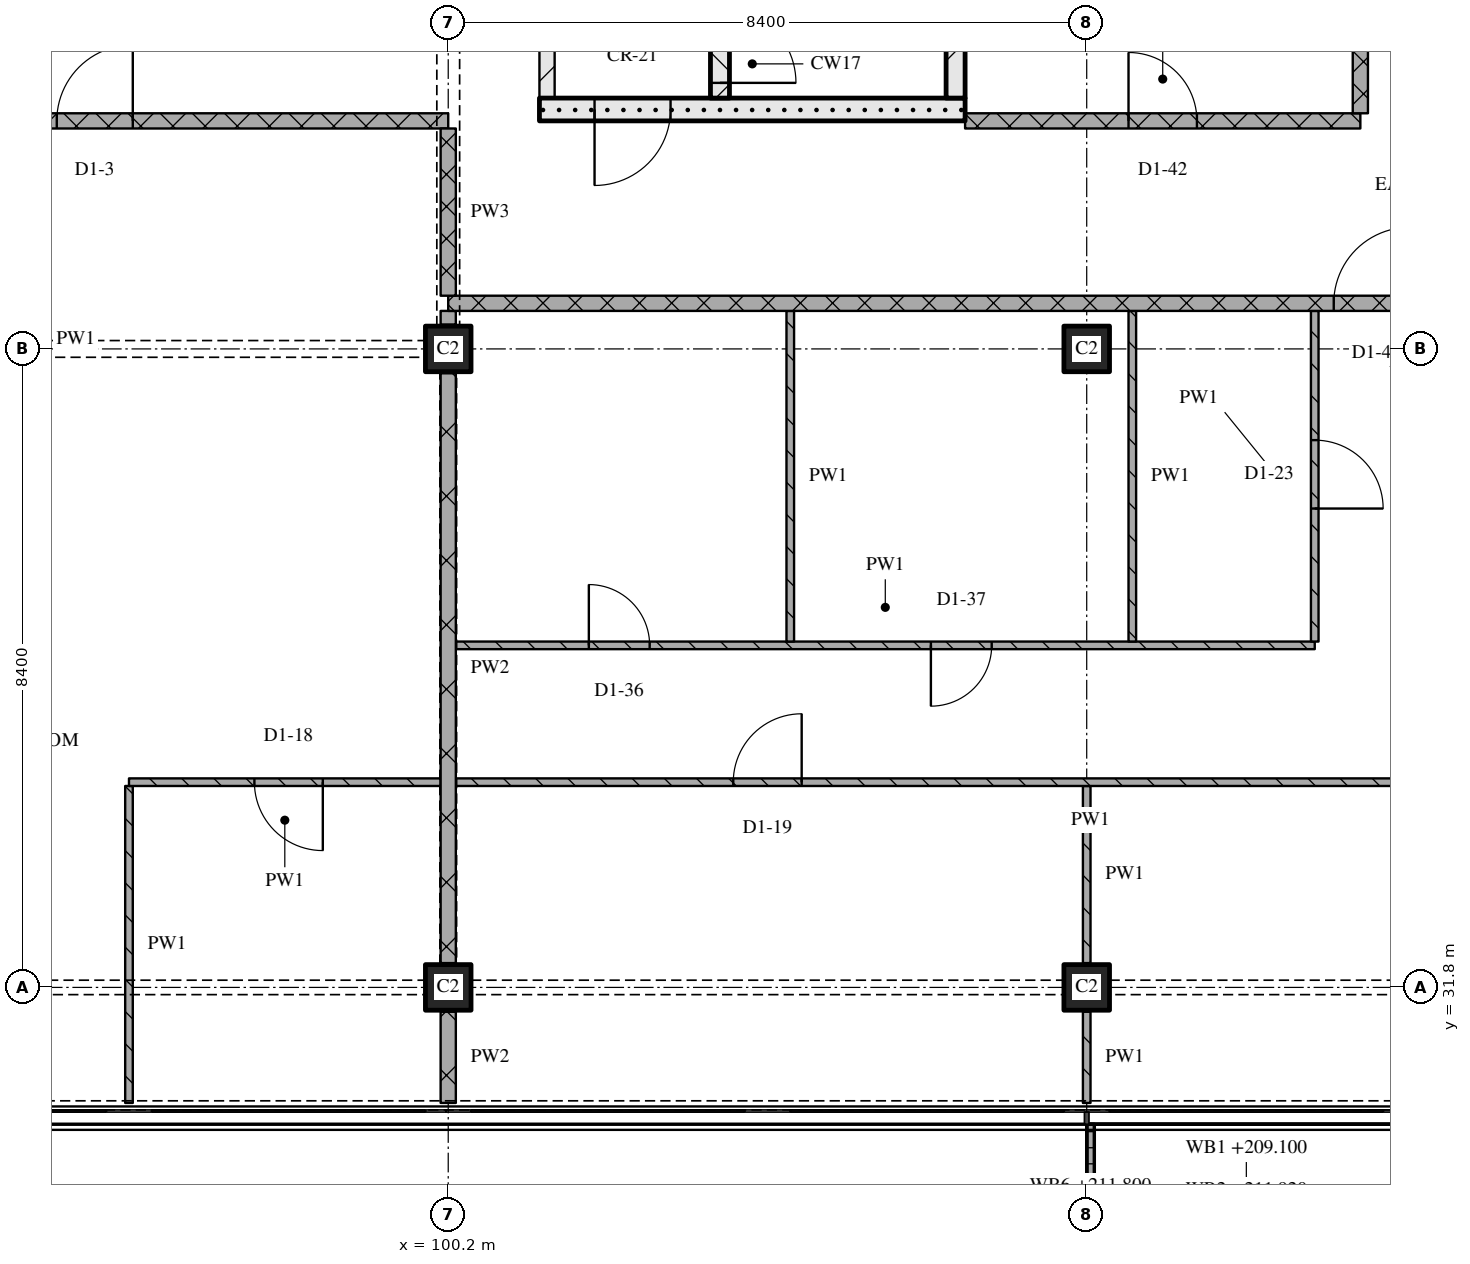
"""IFC4 building model, lengths in metres.
Left out: names, types, materials, properties, quantities, classifications, styles, units other than length and angle.
Written with IfcOpenShell. Run it as: python <this file> out.ifc"""

import sys

from ifc_helpers import new_model, si_unit, direction, frame, frame_2d, origin, origin_2d, place, context, subcontext, project, spatial, polyline, rectangle, outline, extrude, element, fill, save


model = new_model("IFC4")
c1 = context("Model", 3, precision=1e-05, world=origin(), true_north=direction((0.0, 1.0)))
c2 = subcontext(c1, "Body", "Model", "MODEL_VIEW")
j1 = project(units=[si_unit("LENGTHUNIT", "METRE"), si_unit("PLANEANGLEUNIT", "RADIAN")], contexts=[c1])
p1 = place(None, origin())
s1 = spatial("IfcSite", under=j1, at=p1, CompositionType="ELEMENT")
p2 = place(p1, origin())
s2 = spatial("IfcBuilding", under=s1, at=p2, CompositionType="ELEMENT")
p3 = place(p2, frame((0.0, 0.0, 209.1)))
s3 = spatial("IfcBuildingStorey", under=s2, at=p3, CompositionType="ELEMENT", Elevation=209.1)
for number, where, z_axis, x_axis in (
    (1, (100.2, 31.8, 0.0), (0.0, 0.0, 1.0), (1.0, 0.0, 0.0)),
    (2, (100.2, 40.2, 0.0), (0.0, 0.0, 1.0), (1.0, 0.0, 0.0)),
    (3, (108.6, 31.8, 0.0), (0.0, 0.0, 1.0), (1.0, 0.0, 0.0)),
    (4, (108.6, 40.2, 0.0), (0.0, 0.0, 1.0), (1.0, 0.0, 0.0)),
):
    element("IfcColumn", number, at=place(p3, frame(where, z_axis=z_axis, x_axis=x_axis)), inside=s3, PredefinedType="COLUMN", context=c2, shape_type="SweptSolid", body=[
        extrude(rectangle(XDim=0.6, YDim=0.6, at=origin_2d()), origin(), (0.0, 0.0, 1.0), 3.6),
    ])
p4 = place(p3, origin())
e5 = element("IfcWall", 5, at=p4, inside=s3, PredefinedType="SOLIDWALL", context=c2, shape_type="SweptSolid", body=[
    extrude(outline(polyline([(108.6, 30.0), (108.7, 30.0), (108.7, 28.367), (112.7, 28.367), (112.7, 30.0), (112.8, 30.0), (112.8, 28.267), (108.6, 28.267), (108.6, 30.0)])), origin(), (0.0, 0.0, 1.0), 1.0),
])
p5 = place(p3, frame((101.4, 43.35, 0.0), z_axis=(0.0, 0.0, 1.0), x_axis=(1.0, 0.0, 0.0)))
e6 = element("IfcWall", 6, at=p5, inside=s3, PredefinedType="SOLIDWALL", context=c2, shape_type="SweptSolid", body=[
    extrude(rectangle(XDim=5.6, YDim=0.3, at=frame_2d((2.8, 0.0))), origin(), (0.0, 0.0, 1.0), 3.32),
])
p6 = place(p5, frame((0.725, 0.0, 0.0)))
e7 = element("IfcOpeningElement", 7, at=p6, cuts=e6, PredefinedType="OPENING", context=c2, shape_type="SweptSolid", body=[
    extrude(rectangle(XDim=1.0, YDim=2.1, at=frame_2d((0.5, 1.05))), frame((0.0, 0.16, 0.0), z_axis=(0.0, -1.0, 0.0), x_axis=(1.0, 0.0, 0.0)), (0.0, 0.0, 1.0), 0.32),
])
p7 = place(p3, frame((101.5, 43.5, 0.0), z_axis=(0.0, 0.0, 1.0), x_axis=(0.0, 1.0, 0.0)))
e8 = element("IfcWall", 8, at=p7, inside=s3, PredefinedType="PARTITIONING", context=c2, shape_type="SweptSolid", body=[
    extrude(rectangle(XDim=6.9, YDim=0.2, at=frame_2d((3.45, 0.0))), origin(), (0.0, 0.0, 1.0), 3.32),
])
p8 = place(p7, frame((1.0, 0.0, 0.0)))
e9 = element("IfcOpeningElement", 9, at=p8, cuts=e8, PredefinedType="OPENING", context=c2, shape_type="SweptSolid", body=[
    extrude(rectangle(XDim=1.0, YDim=2.1, at=frame_2d((0.5, 1.05))), frame((0.0, 0.11, 0.0), z_axis=(0.0, -1.0, 0.0), x_axis=(1.0, 0.0, 0.0)), (0.0, 0.0, 1.0), 0.22),
])
p9 = place(p3, frame((103.775, 43.5, 0.0), z_axis=(0.0, 0.0, 1.0), x_axis=(0.0, 1.0, 0.0)))
e10 = element("IfcWall", 10, at=p9, inside=s3, PredefinedType="SOLIDWALL", context=c2, shape_type="SweptSolid", body=[
    extrude(rectangle(XDim=6.9, YDim=0.25, at=frame_2d((3.45, 0.0))), origin(), (0.0, 0.0, 1.0), 3.32),
])
p10 = place(p9, frame((0.2, 0.0, 0.0)))
e11 = element("IfcOpeningElement", 11, at=p10, cuts=e10, PredefinedType="OPENING", context=c2, shape_type="SweptSolid", body=[
    extrude(rectangle(XDim=1.0, YDim=2.1, at=frame_2d((0.5, 1.05))), frame((0.0, 0.135, 0.0), z_axis=(0.0, -1.0, 0.0), x_axis=(1.0, 0.0, 0.0)), (0.0, 0.0, 1.0), 0.27),
])
p11 = place(p3, frame((106.875, 43.5, 0.0), z_axis=(0.0, 0.0, 1.0), x_axis=(0.0, 1.0, 0.0)))
e12 = element("IfcWall", 12, at=p11, inside=s3, PredefinedType="SOLIDWALL", context=c2, shape_type="SweptSolid", body=[
    extrude(rectangle(XDim=6.9, YDim=0.25, at=frame_2d((3.45, 0.0))), origin(), (0.0, 0.0, 1.0), 3.32),
])
p12 = place(p3, frame((100.3, 36.3, 0.0), z_axis=(0.0, 0.0, 1.0), x_axis=(1.0, 0.0, 0.0)))
e13 = element("IfcWall", 13, at=p12, inside=s3, PredefinedType="PARTITIONING", context=c2, shape_type="SweptSolid", body=[
    extrude(rectangle(XDim=11.3, YDim=0.1, at=frame_2d((5.65, 0.0))), origin(), (0.0, 0.0, 1.0), 3.32),
])
p13 = place(p12, frame((1.75, 0.0, 0.0)))
e14 = element("IfcOpeningElement", 14, at=p13, cuts=e13, PredefinedType="OPENING", context=c2, shape_type="SweptSolid", body=[
    extrude(rectangle(XDim=0.8, YDim=2.1, at=frame_2d((0.4, 1.05))), frame((0.0, 0.06, 0.0), z_axis=(0.0, -1.0, 0.0), x_axis=(1.0, 0.0, 0.0)), (0.0, 0.0, 1.0), 0.12),
])
p14 = place(p12, frame((6.25, 0.0, 0.0)))
e15 = element("IfcOpeningElement", 15, at=p14, cuts=e13, PredefinedType="OPENING", context=c2, shape_type="SweptSolid", body=[
    extrude(rectangle(XDim=0.8, YDim=2.1, at=frame_2d((0.4, 1.05))), frame((0.0, 0.06, 0.0), z_axis=(0.0, -1.0, 0.0), x_axis=(1.0, 0.0, 0.0)), (0.0, 0.0, 1.0), 0.12),
])
p15 = place(p3, frame((124.58, 40.8, 0.0), z_axis=(0.0, 0.0, 1.0), x_axis=(-1.0, 0.0, 0.0)))
e16 = element("IfcWall", 16, at=p15, inside=s3, PredefinedType="PARTITIONING", context=c2, shape_type="SweptSolid", body=[
    extrude(rectangle(XDim=24.38, YDim=0.2, at=frame_2d((12.19, 0.0))), origin(), (0.0, 0.0, 1.0), 3.32),
])
p16 = place(p15, frame((11.73, 0.0, 0.0)))
e17 = element("IfcOpeningElement", 17, at=p16, cuts=e16, PredefinedType="OPENING", context=c2, shape_type="SweptSolid", body=[
    extrude(rectangle(XDim=1.0, YDim=2.1, at=frame_2d((0.5, 1.05))), frame((0.0, 0.11, 0.0), z_axis=(0.0, -1.0, 0.0), x_axis=(1.0, 0.0, 0.0)), (0.0, 0.0, 1.0), 0.22),
])
p17 = place(p3, frame((100.2, 43.2, 0.0), z_axis=(0.0, 0.0, 1.0), x_axis=(-1.0, 0.0, 0.0)))
e18 = element("IfcWall", 18, at=p17, inside=s3, PredefinedType="PARTITIONING", context=c2, shape_type="SweptSolid", body=[
    extrude(rectangle(XDim=25.2, YDim=0.2, at=frame_2d((12.6, 0.0))), origin(), (0.0, 0.0, 1.0), 3.32),
])
p18 = place(p17, frame((4.15, 0.0, 0.0)))
e19 = element("IfcOpeningElement", 19, at=p18, cuts=e18, PredefinedType="OPENING", context=c2, shape_type="SweptSolid", body=[
    extrude(rectangle(XDim=1.0, YDim=2.1, at=frame_2d((0.5, 1.05))), frame((0.0, 0.11, 0.0), z_axis=(0.0, -1.0, 0.0), x_axis=(1.0, 0.0, 0.0)), (0.0, 0.0, 1.0), 0.22),
])
p19 = place(p17, frame((17.35, 0.0, 0.0)))
e20 = element("IfcOpeningElement", 20, at=p19, cuts=e18, PredefinedType="OPENING", context=c2, shape_type="SweptSolid", body=[
    extrude(rectangle(XDim=1.0, YDim=2.1, at=frame_2d((0.5, 1.05))), frame((0.0, 0.11, 0.0), z_axis=(0.0, -1.0, 0.0), x_axis=(1.0, 0.0, 0.0)), (0.0, 0.0, 1.0), 0.22),
])
p20 = place(p3, frame((107.0, 43.2, 0.0), z_axis=(0.0, 0.0, 1.0), x_axis=(1.0, 0.0, 0.0)))
e21 = element("IfcWall", 21, at=p20, inside=s3, PredefinedType="PARTITIONING", context=c2, shape_type="SweptSolid", body=[
    extrude(rectangle(XDim=5.2, YDim=0.2, at=frame_2d((2.6, 0.0))), origin(), (0.0, 0.0, 1.0), 3.32),
])
p21 = place(p20, frame((2.15, 0.0, 0.0)))
e22 = element("IfcOpeningElement", 22, at=p21, cuts=e21, PredefinedType="OPENING", context=c2, shape_type="SweptSolid", body=[
    extrude(rectangle(XDim=0.9, YDim=2.1, at=frame_2d((0.45, 1.05))), frame((0.0, 0.11, 0.0), z_axis=(0.0, -1.0, 0.0), x_axis=(1.0, 0.0, 0.0)), (0.0, 0.0, 1.0), 0.22),
])
p22 = place(p3, frame((96.0, 34.45, 0.0), z_axis=(0.0, 0.0, 1.0), x_axis=(0.0, -1.0, 0.0)))
e23 = element("IfcWall", 23, at=p22, inside=s3, PredefinedType="PARTITIONING", context=c2, shape_type="SweptSolid", body=[
    extrude(rectangle(XDim=4.17, YDim=0.1, at=frame_2d((2.085, 0.0))), origin(), (0.0, 0.0, 1.0), 3.32),
])
p23 = place(p3, frame((100.2, 43.1, 0.0), z_axis=(0.0, 0.0, 1.0), x_axis=(0.0, -1.0, 0.0)))
e24 = element("IfcWall", 24, at=p23, inside=s3, PredefinedType="PARTITIONING", context=c2, shape_type="SweptSolid", body=[
    extrude(rectangle(XDim=2.2, YDim=0.2, at=frame_2d((1.1, 0.0))), origin(), (0.0, 0.0, 1.0), 2.53),
])
p24 = place(p3, frame((100.2, 31.48, 0.0), z_axis=(0.0, 0.0, 1.0), x_axis=(0.0, -1.0, 0.0)))
e25 = element("IfcWall", 25, at=p24, inside=s3, PredefinedType="PARTITIONING", context=c2, shape_type="SweptSolid", body=[
    extrude(rectangle(XDim=1.2, YDim=0.2, at=frame_2d((0.6, 0.0))), origin(), (0.0, 0.0, 1.0), 3.32),
])
p25 = place(p3, frame((100.2, 39.88, 0.0), z_axis=(0.0, 0.0, 1.0), x_axis=(0.0, -1.0, 0.0)))
e26 = element("IfcWall", 26, at=p25, inside=s3, PredefinedType="PARTITIONING", context=c2, shape_type="SweptSolid", body=[
    extrude(rectangle(XDim=7.76, YDim=0.2, at=frame_2d((3.88, 0.0))), origin(), (0.0, 0.0, 1.0), 2.72),
])
p26 = place(p3, frame((100.2, 40.7, 0.0), z_axis=(0.0, 0.0, 1.0), x_axis=(0.0, -1.0, 0.0)))
e27 = element("IfcWall", 27, at=p26, inside=s3, PredefinedType="PARTITIONING", context=c2, shape_type="SweptSolid", body=[
    extrude(rectangle(XDim=0.18, YDim=0.2, at=frame_2d((0.09, 0.0))), origin(), (0.0, 0.0, 1.0), 3.32),
])
p27 = place(p3, frame((104.7, 40.7, 0.0), z_axis=(0.0, 0.0, 1.0), x_axis=(0.0, -1.0, 0.0)))
e28 = element("IfcWall", 28, at=p27, inside=s3, PredefinedType="PARTITIONING", context=c2, shape_type="SweptSolid", body=[
    extrude(rectangle(XDim=4.35, YDim=0.1, at=frame_2d((2.175, 0.0))), origin(), (0.0, 0.0, 1.0), 3.32),
])
p28 = place(p3, frame((108.6, 31.48, 0.0), z_axis=(0.0, 0.0, 1.0), x_axis=(0.0, -1.0, 0.0)))
e29 = element("IfcWall", 29, at=p28, inside=s3, PredefinedType="PARTITIONING", context=c2, shape_type="SweptSolid", body=[
    extrude(rectangle(XDim=1.2, YDim=0.1, at=frame_2d((0.6, 0.0))), origin(), (0.0, 0.0, 1.0), 3.32),
])
p29 = place(p3, frame((108.6, 34.45, 0.0), z_axis=(0.0, 0.0, 1.0), x_axis=(0.0, -1.0, 0.0)))
e30 = element("IfcWall", 30, at=p29, inside=s3, PredefinedType="PARTITIONING", context=c2, shape_type="SweptSolid", body=[
    extrude(rectangle(XDim=2.33, YDim=0.1, at=frame_2d((1.165, 0.0))), origin(), (0.0, 0.0, 1.0), 3.32),
])
p30 = place(p3, frame((109.2, 40.7, 0.0), z_axis=(0.0, 0.0, 1.0), x_axis=(0.0, -1.0, 0.0)))
e31 = element("IfcWall", 31, at=p30, inside=s3, PredefinedType="PARTITIONING", context=c2, shape_type="SweptSolid", body=[
    extrude(rectangle(XDim=4.35, YDim=0.1, at=frame_2d((2.175, 0.0))), origin(), (0.0, 0.0, 1.0), 3.32),
])
p31 = place(p3, frame((111.6, 36.35, 0.0), z_axis=(0.0, 0.0, 1.0), x_axis=(0.0, 1.0, 0.0)))
e32 = element("IfcWall", 32, at=p31, inside=s3, PredefinedType="PARTITIONING", context=c2, shape_type="SweptSolid", body=[
    extrude(rectangle(XDim=4.35, YDim=0.1, at=frame_2d((2.175, 0.0))), origin(), (0.0, 0.0, 1.0), 3.32),
])
p32 = place(p31, frame((1.75, 0.0, 0.0)))
e33 = element("IfcOpeningElement", 33, at=p32, cuts=e32, PredefinedType="OPENING", context=c2, shape_type="SweptSolid", body=[
    extrude(rectangle(XDim=0.9, YDim=2.1, at=frame_2d((0.45, 1.05))), frame((0.0, 0.06, 0.0), z_axis=(0.0, -1.0, 0.0), x_axis=(1.0, 0.0, 0.0)), (0.0, 0.0, 1.0), 0.12),
])
p33 = place(p3, frame((112.2, 43.3, 0.0), z_axis=(0.0, 0.0, 1.0), x_axis=(0.0, 1.0, 0.0)))
e34 = element("IfcWall", 34, at=p33, inside=s3, PredefinedType="PARTITIONING", context=c2, shape_type="SweptSolid", body=[
    extrude(rectangle(XDim=15.4, YDim=0.2, at=frame_2d((7.7, 0.0))), origin(), (0.0, 0.0, 1.0), 3.32),
])
p34 = place(p33, frame((10.95, 0.0, 0.0)))
e35 = element("IfcOpeningElement", 35, at=p34, cuts=e34, PredefinedType="OPENING", context=c2, shape_type="SweptSolid", body=[
    extrude(rectangle(XDim=1.0, YDim=2.1, at=frame_2d((0.5, 1.05))), frame((0.0, 0.11, 0.0), z_axis=(0.0, -1.0, 0.0), x_axis=(1.0, 0.0, 0.0)), (0.0, 0.0, 1.0), 0.22),
])
p35 = place(p3, frame((100.1, 34.5, 0.0), z_axis=(0.0, 0.0, 1.0), x_axis=(-1.0, 0.0, 0.0)))
e36 = element("IfcWall", 36, at=p35, inside=s3, PredefinedType="PARTITIONING", context=c2, shape_type="SweptSolid", body=[
    extrude(rectangle(XDim=4.1, YDim=0.1, at=frame_2d((2.05, 0.0))), origin(), (0.0, 0.0, 1.0), 3.32),
])
p36 = place(p35, frame((1.55, 0.0, 0.0)))
e37 = element("IfcOpeningElement", 37, at=p36, cuts=e36, PredefinedType="OPENING", context=c2, shape_type="SweptSolid", body=[
    extrude(rectangle(XDim=0.9, YDim=2.1, at=frame_2d((0.45, 1.05))), frame((0.0, 0.06, 0.0), z_axis=(0.0, -1.0, 0.0), x_axis=(1.0, 0.0, 0.0)), (0.0, 0.0, 1.0), 0.12),
])
p37 = place(p3, frame((117.0, 34.5, 0.0), z_axis=(0.0, 0.0, 1.0), x_axis=(-1.0, 0.0, 0.0)))
e38 = element("IfcWall", 38, at=p37, inside=s3, PredefinedType="PARTITIONING", context=c2, shape_type="SweptSolid", body=[
    extrude(rectangle(XDim=16.7, YDim=0.1, at=frame_2d((8.35, 0.0))), origin(), (0.0, 0.0, 1.0), 3.32),
])
p38 = place(p37, frame((12.15, 0.0, 0.0)))
e39 = element("IfcOpeningElement", 39, at=p38, cuts=e38, PredefinedType="OPENING", context=c2, shape_type="SweptSolid", body=[
    extrude(rectangle(XDim=0.9, YDim=2.1, at=frame_2d((0.45, 1.05))), frame((0.0, 0.06, 0.0), z_axis=(0.0, -1.0, 0.0), x_axis=(1.0, 0.0, 0.0)), (0.0, 0.0, 1.0), 0.12),
])
p39 = place(p6, origin())
e40 = element("IfcDoor", 40, at=p39, inside=s3, OperationType="SINGLE_SWING_RIGHT", PredefinedType="DOOR", context=c2, shape_type="SweptSolid", body=[
    extrude(rectangle(XDim=1.0, YDim=2.1, at=frame_2d((0.5, 1.05))), frame((0.0, 0.025, 0.0), z_axis=(0.0, -1.0, 0.0), x_axis=(1.0, 0.0, 0.0)), (0.0, 0.0, 1.0), 0.05),
])
fill(e7, e40)
p40 = place(p10, origin())
e41 = element("IfcDoor", 41, at=p40, inside=s3, OperationType="SINGLE_SWING_RIGHT", PredefinedType="DOOR", context=c2, shape_type="SweptSolid", body=[
    extrude(rectangle(XDim=1.0, YDim=2.1, at=frame_2d((0.5, 1.05))), frame((0.0, 0.025, 0.0), z_axis=(0.0, -1.0, 0.0), x_axis=(1.0, 0.0, 0.0)), (0.0, 0.0, 1.0), 0.05),
])
fill(e11, e41)
p41 = place(p13, origin())
e42 = element("IfcDoor", 42, at=p41, inside=s3, OperationType="SINGLE_SWING_LEFT", PredefinedType="DOOR", context=c2, shape_type="SweptSolid", body=[
    extrude(rectangle(XDim=0.8, YDim=2.1, at=frame_2d((0.4, 1.05))), frame((0.0, 0.025, 0.0), z_axis=(0.0, -1.0, 0.0), x_axis=(1.0, 0.0, 0.0)), (0.0, 0.0, 1.0), 0.05),
])
fill(e14, e42)
p42 = place(p14, origin())
e43 = element("IfcDoor", 43, at=p42, inside=s3, OperationType="SINGLE_SWING_RIGHT", PredefinedType="DOOR", context=c2, shape_type="SweptSolid", body=[
    extrude(rectangle(XDim=0.8, YDim=2.1, at=frame_2d((0.4, 1.05))), frame((0.0, 0.025, 0.0), z_axis=(0.0, -1.0, 0.0), x_axis=(1.0, 0.0, 0.0)), (0.0, 0.0, 1.0), 0.05),
])
fill(e15, e43)
p43 = place(p16, origin())
e44 = element("IfcDoor", 44, at=p43, inside=s3, OperationType="SINGLE_SWING_RIGHT", PredefinedType="DOOR", context=c2, shape_type="SweptSolid", body=[
    extrude(rectangle(XDim=1.0, YDim=2.1, at=frame_2d((0.5, 1.05))), frame((0.0, 0.025, 0.0), z_axis=(0.0, -1.0, 0.0), x_axis=(1.0, 0.0, 0.0)), (0.0, 0.0, 1.0), 0.05),
])
fill(e17, e44)
p44 = place(p18, origin())
e45 = element("IfcDoor", 45, at=p44, inside=s3, OperationType="SINGLE_SWING_RIGHT", PredefinedType="DOOR", context=c2, shape_type="SweptSolid", body=[
    extrude(rectangle(XDim=1.0, YDim=2.1, at=frame_2d((0.5, 1.05))), frame((0.0, 0.025, 0.0), z_axis=(0.0, -1.0, 0.0), x_axis=(1.0, 0.0, 0.0)), (0.0, 0.0, 1.0), 0.05),
])
fill(e19, e45)
p45 = place(p21, origin())
e46 = element("IfcDoor", 46, at=p45, inside=s3, OperationType="SINGLE_SWING_LEFT", PredefinedType="DOOR", context=c2, shape_type="SweptSolid", body=[
    extrude(rectangle(XDim=0.9, YDim=2.1, at=frame_2d((0.45, 1.05))), frame((0.0, 0.025, 0.0), z_axis=(0.0, -1.0, 0.0), x_axis=(1.0, 0.0, 0.0)), (0.0, 0.0, 1.0), 0.05),
])
fill(e22, e46)
p46 = place(p32, origin())
e47 = element("IfcDoor", 47, at=p46, inside=s3, OperationType="SINGLE_SWING_RIGHT", PredefinedType="DOOR", context=c2, shape_type="SweptSolid", body=[
    extrude(rectangle(XDim=0.9, YDim=2.1, at=frame_2d((0.45, 1.05))), frame((0.0, 0.025, 0.0), z_axis=(0.0, -1.0, 0.0), x_axis=(1.0, 0.0, 0.0)), (0.0, 0.0, 1.0), 0.05),
])
fill(e33, e47)
p47 = place(p36, origin())
e48 = element("IfcDoor", 48, at=p47, inside=s3, OperationType="SINGLE_SWING_LEFT", PredefinedType="DOOR", context=c2, shape_type="SweptSolid", body=[
    extrude(rectangle(XDim=0.9, YDim=2.1, at=frame_2d((0.45, 1.05))), frame((0.0, 0.025, 0.0), z_axis=(0.0, -1.0, 0.0), x_axis=(1.0, 0.0, 0.0)), (0.0, 0.0, 1.0), 0.05),
])
fill(e37, e48)
p48 = place(p38, origin())
e49 = element("IfcDoor", 49, at=p48, inside=s3, OperationType="SINGLE_SWING_RIGHT", PredefinedType="DOOR", context=c2, shape_type="SweptSolid", body=[
    extrude(rectangle(XDim=0.9, YDim=2.1, at=frame_2d((0.45, 1.05))), frame((0.0, 0.025, 0.0), z_axis=(0.0, -1.0, 0.0), x_axis=(1.0, 0.0, 0.0)), (0.0, 0.0, 1.0), 0.05),
])
fill(e39, e49)
save(model, sys.argv[1])
